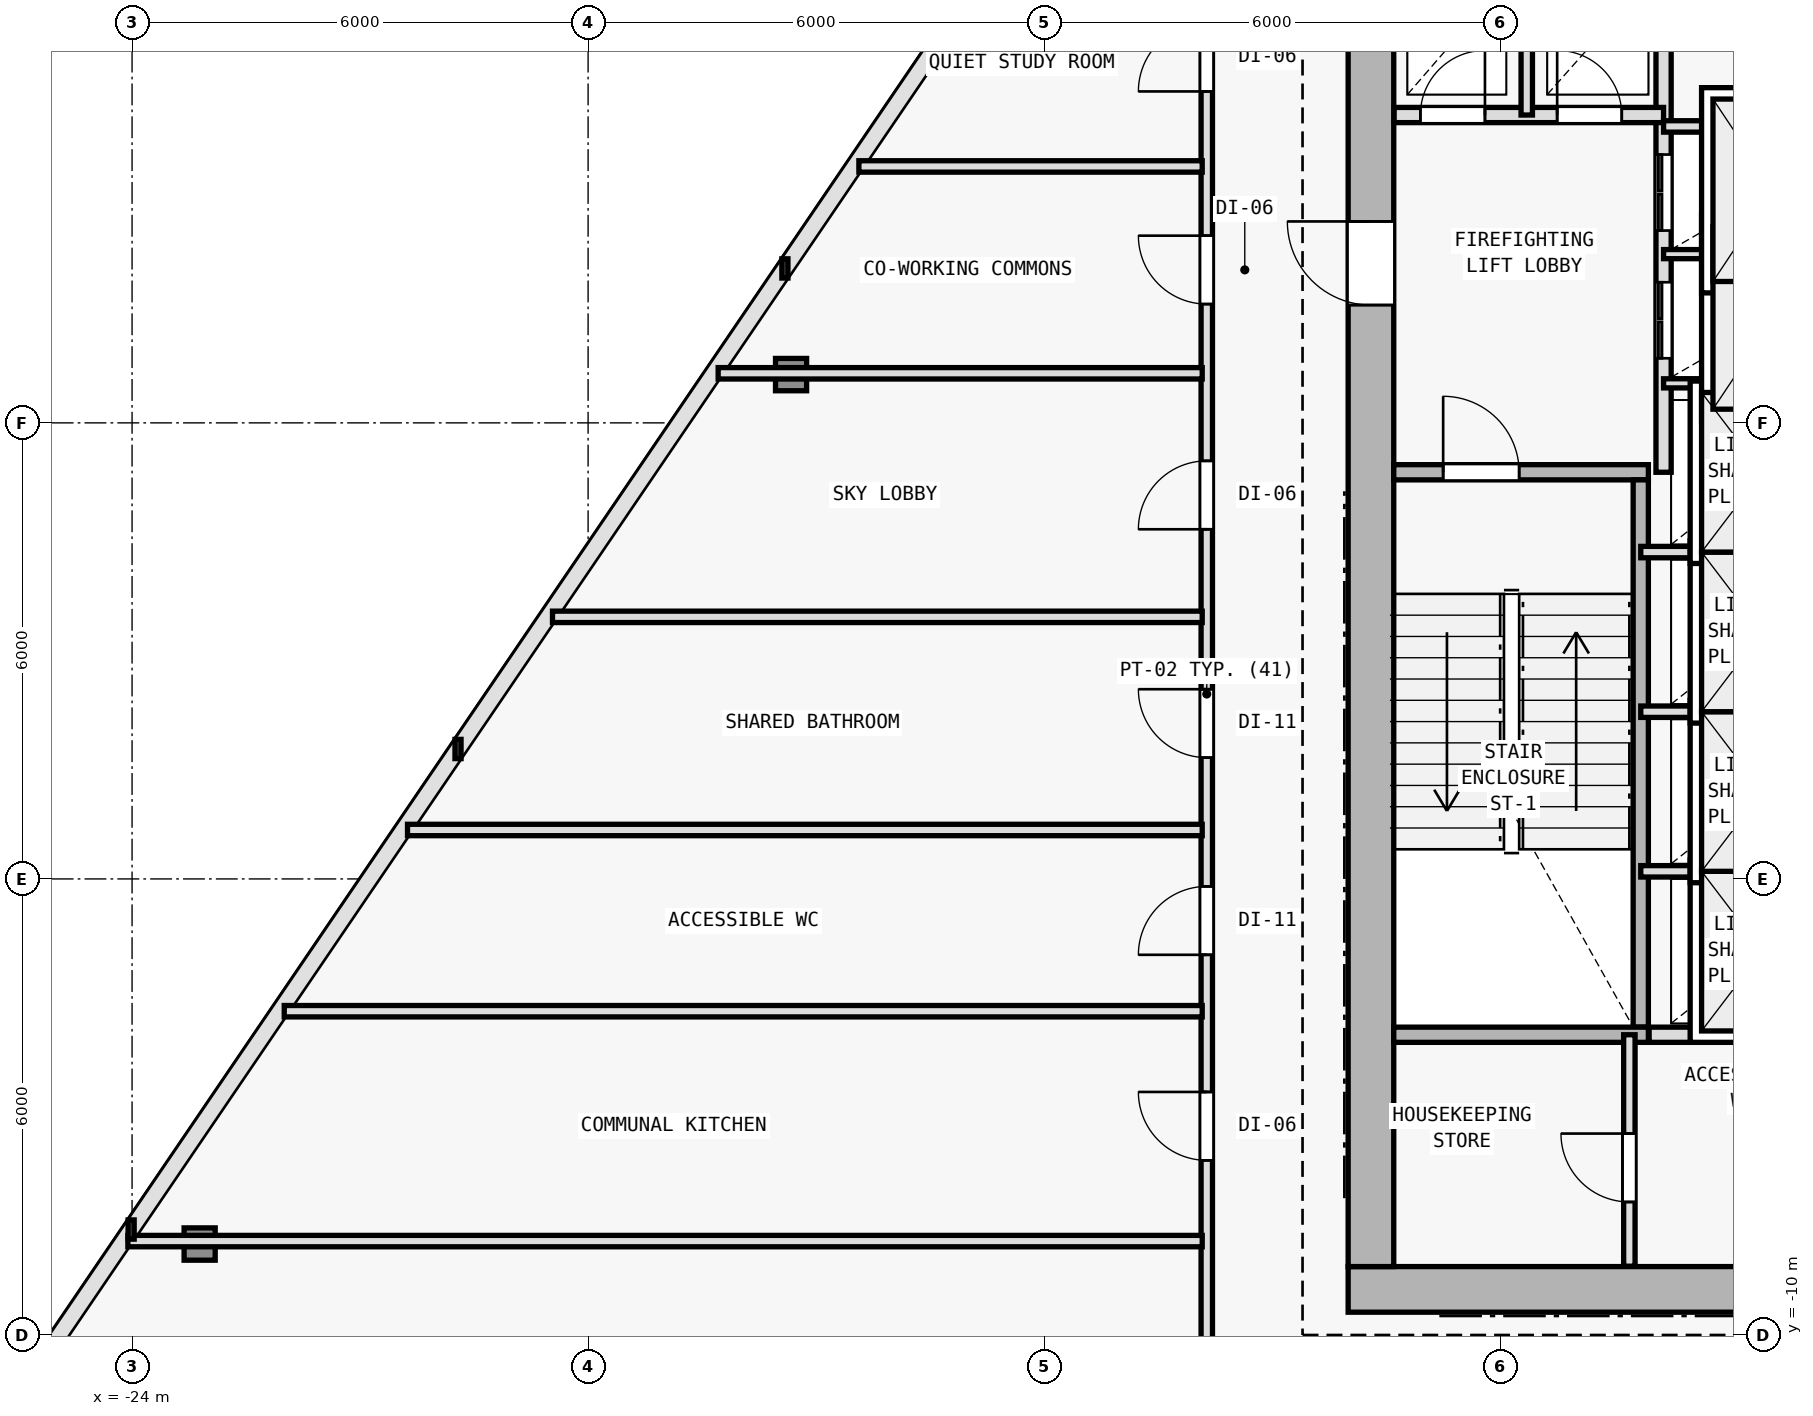
"""IFC4 building model, lengths in metres.
Left out: names, types, materials, properties, quantities, classifications, styles, units other than length and angle.
Written with IfcOpenShell. Run it as: python <this file> out.ifc"""

import sys

from ifc_helpers import new_model, si_unit, direction, frame, frame_2d, origin, origin_2d, place, context, subcontext, project, spatial, rectangle, i_section, extrude, element, fill, save


model = new_model("IFC4")
c1 = context("Model", 3, precision=1e-05, world=origin(), true_north=direction((0.0, 1.0)))
c2 = subcontext(c1, "Body", "Model", "MODEL_VIEW")
j1 = project(units=[si_unit("LENGTHUNIT", "METRE"), si_unit("PLANEANGLEUNIT", "RADIAN")], contexts=[c1])
p1 = place(None, origin())
s1 = spatial("IfcSite", under=j1, at=p1, CompositionType="ELEMENT")
p2 = place(p1, origin())
s2 = spatial("IfcBuilding", under=s1, at=p2, CompositionType="ELEMENT")
p3 = place(p2, frame((0.0, 0.0, 78.0)))
s3 = spatial("IfcBuildingStorey", under=s2, at=p3, CompositionType="ELEMENT", Elevation=78.0)
for number, where, z_axis, x_axis in (
    (1, (-7.7, -9.4, 0.0), (0.0, 0.0, 1.0), (1.0, 0.0, 0.0)),
    (2, (-7.7, 2.0, 0.0), (0.0, 0.0, 1.0), (1.0, 0.0, 0.0)),
):
    element("IfcColumn", number, at=place(p3, frame(where, z_axis=z_axis, x_axis=x_axis)), inside=s3, PredefinedType="COLUMN", context=c2, shape_type="SweptSolid", body=[
        extrude(i_section(OverallWidth=0.416, OverallDepth=0.446, WebThickness=0.025, FlangeThickness=0.04, FilletRadius=0.015, at=origin_2d()), origin(), (0.0, 0.0, 1.0), 4.5),
    ])
p4 = place(p3, frame((-15.33, 2.635, 0.006), z_axis=(0.013595651427, 0.007613564799, 0.999878588576), x_axis=(-0.488603368932, 0.87250601595, 0.0)))
e3 = element("IfcColumn", 3, at=p4, inside=s3, PredefinedType="COLUMN", context=c2, shape_type="SweptSolid", body=[
    extrude(i_section(OverallWidth=0.409, OverallDepth=0.425, WebThickness=0.021, FlangeThickness=0.034, FilletRadius=0.015, at=origin_2d()), origin(), (0.0, 0.0, 1.0), 4.489),
])
p5 = place(p3, frame((-23.111, -8.803, 0.006), z_axis=(0.020171274264, 0.017289663655, 0.999647031319), x_axis=(-0.650791373456, 0.759256602365, 0.0)))
e4 = element("IfcColumn", 4, at=p5, inside=s3, PredefinedType="COLUMN", context=c2, shape_type="SweptSolid", body=[
    extrude(i_section(OverallWidth=0.409, OverallDepth=0.425, WebThickness=0.021, FlangeThickness=0.034, FilletRadius=0.015, at=origin_2d()), origin(), (0.0, 0.0, 1.0), 4.49),
])
p6 = place(p3, frame((-8.0, -9.4, 0.0), z_axis=(0.0, 0.0, 1.0), x_axis=(1.0, 0.0, 0.0)))
e5 = element("IfcWall", 5, at=p6, inside=s3, PredefinedType="SHEAR", context=c2, shape_type="SweptSolid", body=[
    extrude(rectangle(XDim=16.0, YDim=0.6, at=frame_2d((8.0, 0.0))), origin(), (0.0, 0.0, 1.0), 4.25),
])
p7 = place(p6, frame((9.65, 0.0, 0.0)))
e6 = element("IfcOpeningElement", 6, at=p7, cuts=e5, PredefinedType="OPENING", context=c2, shape_type="SweptSolid", body=[
    extrude(rectangle(XDim=1.5, YDim=2.2, at=frame_2d((0.75, 1.1))), frame((0.0, 0.31, 0.0), z_axis=(0.0, -1.0, 0.0), x_axis=(1.0, 0.0, 0.0)), (0.0, 0.0, 1.0), 0.62),
])
p8 = place(p3, frame((-7.7, -9.1, 0.0), z_axis=(0.0, 0.0, 1.0), x_axis=(0.0, 1.0, 0.0)))
e7 = element("IfcWall", 7, at=p8, inside=s3, PredefinedType="SHEAR", context=c2, shape_type="SweptSolid", body=[
    extrude(rectangle(XDim=19.0, YDim=0.6, at=frame_2d((9.5, 0.0))), origin(), (0.0, 0.0, 1.0), 4.25),
])
p9 = place(p8, frame((12.65, 0.0, 0.0)))
e8 = element("IfcOpeningElement", 8, at=p9, cuts=e7, PredefinedType="OPENING", context=c2, shape_type="SweptSolid", body=[
    extrude(rectangle(XDim=1.1, YDim=2.15, at=frame_2d((0.55, 1.075))), frame((0.0, 0.31, 0.0), z_axis=(0.0, -1.0, 0.0), x_axis=(1.0, 0.0, 0.0)), (0.0, 0.0, 1.0), 0.62),
])
p10 = place(p3, frame((-7.4, 1.35, 0.0), z_axis=(0.0, 0.0, 1.0), x_axis=(1.0, 0.0, 0.0)))
e9 = element("IfcWall", 9, at=p10, inside=s3, PredefinedType="SOLIDWALL", context=c2, shape_type="SweptSolid", body=[
    extrude(rectangle(XDim=3.35, YDim=0.2, at=frame_2d((1.675, 0.0))), origin(), (0.0, 0.0, 1.0), 4.25),
])
p11 = place(p10, frame((0.65, 0.0, 0.0)))
e10 = element("IfcOpeningElement", 10, at=p11, cuts=e9, PredefinedType="OPENING", context=c2, shape_type="SweptSolid", body=[
    extrude(rectangle(XDim=1.0, YDim=2.15, at=frame_2d((0.5, 1.075))), frame((0.0, 0.11, 0.0), z_axis=(0.0, -1.0, 0.0), x_axis=(1.0, 0.0, 0.0)), (0.0, 0.0, 1.0), 0.22),
])
p12 = place(p3, frame((-4.15, -5.95, 0.0), z_axis=(0.0, 0.0, 1.0), x_axis=(0.0, 1.0, 0.0)))
e11 = element("IfcWall", 11, at=p12, inside=s3, PredefinedType="SOLIDWALL", context=c2, shape_type="SweptSolid", body=[
    extrude(rectangle(XDim=7.2, YDim=0.2, at=frame_2d((3.6, 0.0))), origin(), (0.0, 0.0, 1.0), 4.25),
])
p13 = place(p3, frame((-3.85, 1.35, 0.0), z_axis=(0.0, 0.0, 1.0), x_axis=(0.0, 1.0, 0.0)))
e12 = element("IfcWall", 12, at=p13, inside=s3, PredefinedType="SOLIDWALL", context=c2, shape_type="SweptSolid", body=[
    extrude(rectangle(XDim=8.545, YDim=0.2, at=frame_2d((4.272, 0.0))), origin(), (0.0, 0.0, 1.0), 4.25),
])
p14 = place(p13, frame((1.5, 0.0, 0.0)))
e13 = element("IfcOpeningElement", 13, at=p14, cuts=e12, PredefinedType="OPENING", context=c2, shape_type="SweptSolid", body=[
    extrude(rectangle(XDim=1.0, YDim=2.15, at=frame_2d((0.5, 1.075))), frame((0.0, 0.11, 0.0), z_axis=(0.0, -1.0, 0.0), x_axis=(1.0, 0.0, 0.0)), (0.0, 0.0, 1.0), 0.22),
])
p15 = place(p13, frame((3.18, 0.0, 0.0)))
e14 = element("IfcOpeningElement", 14, at=p15, cuts=e12, PredefinedType="OPENING", context=c2, shape_type="SweptSolid", body=[
    extrude(rectangle(XDim=1.0, YDim=2.15, at=frame_2d((0.5, 1.075))), frame((0.0, 0.11, 0.0), z_axis=(0.0, -1.0, 0.0), x_axis=(1.0, 0.0, 0.0)), (0.0, 0.0, 1.0), 0.22),
])
p16 = place(p3, frame((-7.395, 6.05, 0.0), z_axis=(0.0, 0.0, 1.0), x_axis=(1.0, 0.0, 0.0)))
e15 = element("IfcWall", 15, at=p16, inside=s3, PredefinedType="SOLIDWALL", context=c2, shape_type="SweptSolid", body=[
    extrude(rectangle(XDim=3.545, YDim=0.2, at=frame_2d((1.772, 0.0))), origin(), (0.0, 0.0, 1.0), 4.25),
])
p17 = place(p16, frame((0.345, 0.0, 0.0)))
e16 = element("IfcOpeningElement", 16, at=p17, cuts=e15, PredefinedType="OPENING", context=c2, shape_type="SweptSolid", body=[
    extrude(rectangle(XDim=0.85, YDim=2.1, at=frame_2d((0.425, 1.05))), frame((0.0, 0.11, 0.0), z_axis=(0.0, -1.0, 0.0), x_axis=(1.0, 0.0, 0.0)), (0.0, 0.0, 1.0), 0.22),
])
p18 = place(p16, frame((2.145, 0.0, 0.0)))
e17 = element("IfcOpeningElement", 17, at=p18, cuts=e15, PredefinedType="OPENING", context=c2, shape_type="SweptSolid", body=[
    extrude(rectangle(XDim=0.85, YDim=2.1, at=frame_2d((0.425, 1.05))), frame((0.0, 0.11, 0.0), z_axis=(0.0, -1.0, 0.0), x_axis=(1.0, 0.0, 0.0)), (0.0, 0.0, 1.0), 0.22),
])
p19 = place(p3, frame((-5.65, 6.05, 0.0), z_axis=(0.0, 0.0, 1.0), x_axis=(0.0, 1.0, 0.0)))
e18 = element("IfcWall", 18, at=p19, inside=s3, PredefinedType="PARTITIONING", context=c2, shape_type="SweptSolid", body=[
    extrude(rectangle(XDim=2.05, YDim=0.15, at=frame_2d((1.025, 0.0))), origin(), (0.0, 0.0, 1.0), 4.25),
])
for number, where, z_axis, x_axis in (
    (19, (-3.85, 2.52, 0.0), (0.0, 0.0, 1.0), (1.0, 0.0, 0.0)),
    (20, (-3.85, 4.22, 0.0), (0.0, 0.0, 1.0), (1.0, 0.0, 0.0)),
):
    element("IfcWall", number, at=place(p3, frame(where, z_axis=z_axis, x_axis=x_axis)), inside=s3, PredefinedType="PARTITIONING", context=c2, shape_type="SweptSolid", body=[
        extrude(rectangle(XDim=2.9, YDim=0.12, at=frame_2d((1.45, 0.0))), origin(), (0.0, 0.0, 1.0), 4.25),
    ])
p20 = place(p3, frame((-3.85, 5.9, 0.0), z_axis=(0.0, 0.0, 1.0), x_axis=(1.0, 0.0, 0.0)))
e21 = element("IfcWall", 21, at=p20, inside=s3, PredefinedType="PARTITIONING", context=c2, shape_type="SweptSolid", body=[
    extrude(rectangle(XDim=2.9, YDim=0.15, at=frame_2d((1.45, 0.0))), origin(), (0.0, 0.0, 1.0), 4.25),
])
for number, where, z_axis, x_axis in (
    (22, (-4.15, -3.9, 0.0), (0.0, 0.0, 1.0), (1.0, 0.0, 0.0)),
    (23, (-4.15, -1.8, 0.0), (0.0, 0.0, 1.0), (1.0, 0.0, 0.0)),
    (24, (-4.15, 0.3, 0.0), (0.0, 0.0, 1.0), (1.0, 0.0, 0.0)),
):
    element("IfcWall", number, at=place(p3, frame(where, z_axis=z_axis, x_axis=x_axis)), inside=s3, PredefinedType="PARTITIONING", context=c2, shape_type="SweptSolid", body=[
        extrude(rectangle(XDim=2.9, YDim=0.15, at=frame_2d((1.45, 0.0))), origin(), (0.0, 0.0, 1.0), 4.25),
    ])
p21 = place(p3, frame((-7.4, -6.05, 0.0), z_axis=(0.0, 0.0, 1.0), x_axis=(1.0, 0.0, 0.0)))
e25 = element("IfcWall", 25, at=p21, inside=s3, PredefinedType="SOLIDWALL", context=c2, shape_type="SweptSolid", body=[
    extrude(rectangle(XDim=3.35, YDim=0.2, at=frame_2d((1.675, 0.0))), origin(), (0.0, 0.0, 1.0), 4.25),
])
p22 = place(p3, frame((-4.04, -6.05, 0.0), z_axis=(0.0, 0.0, 1.0), x_axis=(1.0, 0.0, 0.0)))
e26 = element("IfcWall", 26, at=p22, inside=s3, PredefinedType="SOLIDWALL", context=c2, shape_type="SweptSolid", body=[
    extrude(rectangle(XDim=2.79, YDim=0.2, at=frame_2d((1.395, 0.0))), origin(), (0.0, 0.0, 1.0), 4.25),
])
p23 = place(p3, frame((-4.3, -9.095, 0.0), z_axis=(0.0, 0.0, 1.0), x_axis=(0.0, 1.0, 0.0)))
e27 = element("IfcWall", 27, at=p23, inside=s3, PredefinedType="PARTITIONING", context=c2, shape_type="SweptSolid", body=[
    extrude(rectangle(XDim=3.045, YDim=0.15, at=frame_2d((1.522, 0.0))), origin(), (0.0, 0.0, 1.0), 4.25),
])
p24 = place(p23, frame((0.845, 0.0, 0.0)))
e28 = element("IfcOpeningElement", 28, at=p24, cuts=e27, PredefinedType="OPENING", context=c2, shape_type="SweptSolid", body=[
    extrude(rectangle(XDim=0.9, YDim=2.1, at=frame_2d((0.45, 1.05))), frame((0.0, 0.085, 0.0), z_axis=(0.0, -1.0, 0.0), x_axis=(1.0, 0.0, 0.0)), (0.0, 0.0, 1.0), 0.17),
])
p25 = place(p3, frame((-9.86, -11.56, 0.0), z_axis=(0.0, 0.0, 1.0), x_axis=(0.0, 1.0, 0.0)))
e29 = element("IfcWall", 29, at=p25, inside=s3, PredefinedType="PARTITIONING", context=c2, shape_type="SweptSolid", body=[
    extrude(rectangle(XDim=19.986, YDim=0.15, at=frame_2d((9.993, 0.0))), origin(), (0.0, 0.0, 1.0), 3.509),
])
p26 = place(p25, frame((9.156, 0.0, 0.0)))
e30 = element("IfcOpeningElement", 30, at=p26, cuts=e29, PredefinedType="OPENING", context=c2, shape_type="SweptSolid", body=[
    extrude(rectangle(XDim=0.9, YDim=2.1, at=frame_2d((0.45, 1.05))), frame((0.0, 0.085, 0.0), z_axis=(0.0, -1.0, 0.0), x_axis=(1.0, 0.0, 0.0)), (0.0, 0.0, 1.0), 0.17),
])
p27 = place(p25, frame((6.562, 0.0, 0.0)))
e31 = element("IfcOpeningElement", 31, at=p27, cuts=e29, PredefinedType="OPENING", context=c2, shape_type="SweptSolid", body=[
    extrude(rectangle(XDim=0.9, YDim=2.1, at=frame_2d((0.45, 1.05))), frame((0.0, 0.085, 0.0), z_axis=(0.0, -1.0, 0.0), x_axis=(1.0, 0.0, 0.0)), (0.0, 0.0, 1.0), 0.17),
])
p28 = place(p25, frame((3.857, 0.0, 0.0)))
e32 = element("IfcOpeningElement", 32, at=p28, cuts=e29, PredefinedType="OPENING", context=c2, shape_type="SweptSolid", body=[
    extrude(rectangle(XDim=0.9, YDim=2.1, at=frame_2d((0.45, 1.05))), frame((0.0, 0.085, 0.0), z_axis=(0.0, -1.0, 0.0), x_axis=(1.0, 0.0, 0.0)), (0.0, 0.0, 1.0), 0.17),
])
p29 = place(p25, frame((17.92, 0.0, 0.0)))
e33 = element("IfcOpeningElement", 33, at=p29, cuts=e29, PredefinedType="OPENING", context=c2, shape_type="SweptSolid", body=[
    extrude(rectangle(XDim=0.9, YDim=2.1, at=frame_2d((0.45, 1.05))), frame((0.0, 0.085, 0.0), z_axis=(0.0, -1.0, 0.0), x_axis=(1.0, 0.0, 0.0)), (0.0, 0.0, 1.0), 0.17),
])
p30 = place(p25, frame((15.123, 0.0, 0.0)))
e34 = element("IfcOpeningElement", 34, at=p30, cuts=e29, PredefinedType="OPENING", context=c2, shape_type="SweptSolid", body=[
    extrude(rectangle(XDim=0.9, YDim=2.1, at=frame_2d((0.45, 1.05))), frame((0.0, 0.085, 0.0), z_axis=(0.0, -1.0, 0.0), x_axis=(1.0, 0.0, 0.0)), (0.0, 0.0, 1.0), 0.17),
])
p31 = place(p25, frame((12.16, 0.0, 0.0)))
e35 = element("IfcOpeningElement", 35, at=p31, cuts=e29, PredefinedType="OPENING", context=c2, shape_type="SweptSolid", body=[
    extrude(rectangle(XDim=0.9, YDim=2.1, at=frame_2d((0.45, 1.05))), frame((0.0, 0.085, 0.0), z_axis=(0.0, -1.0, 0.0), x_axis=(1.0, 0.0, 0.0)), (0.0, 0.0, 1.0), 0.17),
])
p32 = place(p3, frame((-9.92, 2.652, 0.0), z_axis=(0.0, 0.0, 1.0), x_axis=(-1.0, 0.0, 0.0)))
e36 = element("IfcWall", 36, at=p32, inside=s3, PredefinedType="PARTITIONING", context=c2, shape_type="SweptSolid", body=[
    extrude(rectangle(XDim=6.369, YDim=0.15, at=frame_2d((3.185, 0.0))), origin(), (0.0, 0.0, 1.0), 3.725),
])
p33 = place(p3, frame((-9.92, -8.765, 0.0), z_axis=(0.0, 0.0, 1.0), x_axis=(-1.0, 0.0, 0.0)))
e37 = element("IfcWall", 37, at=p33, inside=s3, PredefinedType="PARTITIONING", context=c2, shape_type="SweptSolid", body=[
    extrude(rectangle(XDim=14.135, YDim=0.15, at=frame_2d((7.068, 0.0))), origin(), (0.0, 0.0, 1.0), 3.509),
])
p34 = place(p3, frame((-9.92, -3.356, 0.0), z_axis=(0.0, 0.0, 1.0), x_axis=(-1.0, 0.0, 0.0)))
e38 = element("IfcWall", 38, at=p34, inside=s3, PredefinedType="PARTITIONING", context=c2, shape_type="SweptSolid", body=[
    extrude(rectangle(XDim=10.456, YDim=0.15, at=frame_2d((5.228, 0.0))), origin(), (0.0, 0.0, 1.0), 3.735),
])
p35 = place(p3, frame((-9.92, -0.552, 0.0), z_axis=(0.0, 0.0, 1.0), x_axis=(-1.0, 0.0, 0.0)))
e39 = element("IfcWall", 39, at=p35, inside=s3, PredefinedType="PARTITIONING", context=c2, shape_type="SweptSolid", body=[
    extrude(rectangle(XDim=8.549, YDim=0.15, at=frame_2d((4.274, 0.0))), origin(), (0.0, 0.0, 1.0), 3.735),
])
p36 = place(p3, frame((-9.92, -5.74, 0.0), z_axis=(0.0, 0.0, 1.0), x_axis=(-1.0, 0.0, 0.0)))
e40 = element("IfcWall", 40, at=p36, inside=s3, PredefinedType="PARTITIONING", context=c2, shape_type="SweptSolid", body=[
    extrude(rectangle(XDim=12.078, YDim=0.15, at=frame_2d((6.039, 0.0))), origin(), (0.0, 0.0, 1.0), 3.735),
])
p37 = place(p3, frame((-9.92, 5.374, 0.0), z_axis=(0.0, 0.0, 1.0), x_axis=(-1.0, 0.0, 0.0)))
e41 = element("IfcWall", 41, at=p37, inside=s3, PredefinedType="PARTITIONING", context=c2, shape_type="SweptSolid", body=[
    extrude(rectangle(XDim=4.517, YDim=0.15, at=frame_2d((2.259, 0.0))), origin(), (0.0, 0.0, 1.0), 3.725),
])
p38 = place(p9, origin())
e42 = element("IfcDoor", 42, at=p38, inside=s3, OperationType="SINGLE_SWING_RIGHT", PredefinedType="DOOR", context=c2, shape_type="SweptSolid", body=[
    extrude(rectangle(XDim=1.1, YDim=2.15, at=frame_2d((0.55, 1.075))), frame((0.0, 0.025, 0.0), z_axis=(0.0, -1.0, 0.0), x_axis=(1.0, 0.0, 0.0)), (0.0, 0.0, 1.0), 0.05),
])
fill(e8, e42)
p39 = place(p11, origin())
e43 = element("IfcDoor", 43, at=p39, inside=s3, OperationType="SINGLE_SWING_LEFT", PredefinedType="DOOR", context=c2, shape_type="SweptSolid", body=[
    extrude(rectangle(XDim=1.0, YDim=2.15, at=frame_2d((0.5, 1.075))), frame((0.0, 0.025, 0.0), z_axis=(0.0, -1.0, 0.0), x_axis=(1.0, 0.0, 0.0)), (0.0, 0.0, 1.0), 0.05),
])
fill(e10, e43)
p40 = place(p17, origin())
e44 = element("IfcDoor", 44, at=p40, inside=s3, OperationType="SINGLE_SWING_RIGHT", PredefinedType="DOOR", context=c2, shape_type="SweptSolid", body=[
    extrude(rectangle(XDim=0.85, YDim=2.1, at=frame_2d((0.425, 1.05))), frame((0.0, 0.025, 0.0), z_axis=(0.0, -1.0, 0.0), x_axis=(1.0, 0.0, 0.0)), (0.0, 0.0, 1.0), 0.05),
])
fill(e16, e44)
p41 = place(p18, origin())
e45 = element("IfcDoor", 45, at=p41, inside=s3, OperationType="SINGLE_SWING_LEFT", PredefinedType="DOOR", context=c2, shape_type="SweptSolid", body=[
    extrude(rectangle(XDim=0.85, YDim=2.1, at=frame_2d((0.425, 1.05))), frame((0.0, 0.025, 0.0), z_axis=(0.0, -1.0, 0.0), x_axis=(1.0, 0.0, 0.0)), (0.0, 0.0, 1.0), 0.05),
])
fill(e17, e45)
p42 = place(p14, origin())
e46 = element("IfcDoor", 46, at=p42, inside=s3, OperationType="DOUBLE_DOOR_SLIDING", PredefinedType="DOOR", context=c2, shape_type="SweptSolid", body=[
    extrude(rectangle(XDim=1.0, YDim=2.15, at=frame_2d((0.5, 1.075))), frame((0.0, 0.025, 0.0), z_axis=(0.0, -1.0, 0.0), x_axis=(1.0, 0.0, 0.0)), (0.0, 0.0, 1.0), 0.05),
])
fill(e13, e46)
p43 = place(p15, origin())
e47 = element("IfcDoor", 47, at=p43, inside=s3, OperationType="DOUBLE_DOOR_SLIDING", PredefinedType="DOOR", context=c2, shape_type="SweptSolid", body=[
    extrude(rectangle(XDim=1.0, YDim=2.15, at=frame_2d((0.5, 1.075))), frame((0.0, 0.025, 0.0), z_axis=(0.0, -1.0, 0.0), x_axis=(1.0, 0.0, 0.0)), (0.0, 0.0, 1.0), 0.05),
])
fill(e14, e47)
p44 = place(p24, origin())
e48 = element("IfcDoor", 48, at=p44, inside=s3, OperationType="SINGLE_SWING_RIGHT", PredefinedType="DOOR", context=c2, shape_type="SweptSolid", body=[
    extrude(rectangle(XDim=0.9, YDim=2.1, at=frame_2d((0.45, 1.05))), frame((0.0, 0.025, 0.0), z_axis=(0.0, -1.0, 0.0), x_axis=(1.0, 0.0, 0.0)), (0.0, 0.0, 1.0), 0.05),
])
fill(e28, e48)
p45 = place(p26, origin())
e49 = element("IfcDoor", 49, at=p45, inside=s3, OperationType="SINGLE_SWING_RIGHT", PredefinedType="DOOR", context=c2, shape_type="SweptSolid", body=[
    extrude(rectangle(XDim=0.9, YDim=2.1, at=frame_2d((0.45, 1.05))), frame((0.0, 0.025, 0.0), z_axis=(0.0, -1.0, 0.0), x_axis=(1.0, 0.0, 0.0)), (0.0, 0.0, 1.0), 0.05),
])
fill(e30, e49)
p46 = place(p27, origin())
e50 = element("IfcDoor", 50, at=p46, inside=s3, OperationType="SINGLE_SWING_LEFT", PredefinedType="DOOR", context=c2, shape_type="SweptSolid", body=[
    extrude(rectangle(XDim=0.9, YDim=2.1, at=frame_2d((0.45, 1.05))), frame((0.0, 0.025, 0.0), z_axis=(0.0, -1.0, 0.0), x_axis=(1.0, 0.0, 0.0)), (0.0, 0.0, 1.0), 0.05),
])
fill(e31, e50)
p47 = place(p28, origin())
e51 = element("IfcDoor", 51, at=p47, inside=s3, OperationType="SINGLE_SWING_RIGHT", PredefinedType="DOOR", context=c2, shape_type="SweptSolid", body=[
    extrude(rectangle(XDim=0.9, YDim=2.1, at=frame_2d((0.45, 1.05))), frame((0.0, 0.025, 0.0), z_axis=(0.0, -1.0, 0.0), x_axis=(1.0, 0.0, 0.0)), (0.0, 0.0, 1.0), 0.05),
])
fill(e32, e51)
p48 = place(p29, origin())
e52 = element("IfcDoor", 52, at=p48, inside=s3, OperationType="SINGLE_SWING_LEFT", PredefinedType="DOOR", context=c2, shape_type="SweptSolid", body=[
    extrude(rectangle(XDim=0.9, YDim=2.1, at=frame_2d((0.45, 1.05))), frame((0.0, 0.025, 0.0), z_axis=(0.0, -1.0, 0.0), x_axis=(1.0, 0.0, 0.0)), (0.0, 0.0, 1.0), 0.05),
])
fill(e33, e52)
p49 = place(p30, origin())
e53 = element("IfcDoor", 53, at=p49, inside=s3, OperationType="SINGLE_SWING_RIGHT", PredefinedType="DOOR", context=c2, shape_type="SweptSolid", body=[
    extrude(rectangle(XDim=0.9, YDim=2.1, at=frame_2d((0.45, 1.05))), frame((0.0, 0.025, 0.0), z_axis=(0.0, -1.0, 0.0), x_axis=(1.0, 0.0, 0.0)), (0.0, 0.0, 1.0), 0.05),
])
fill(e34, e53)
p50 = place(p31, origin())
e54 = element("IfcDoor", 54, at=p50, inside=s3, OperationType="SINGLE_SWING_LEFT", PredefinedType="DOOR", context=c2, shape_type="SweptSolid", body=[
    extrude(rectangle(XDim=0.9, YDim=2.1, at=frame_2d((0.45, 1.05))), frame((0.0, 0.025, 0.0), z_axis=(0.0, -1.0, 0.0), x_axis=(1.0, 0.0, 0.0)), (0.0, 0.0, 1.0), 0.05),
])
fill(e35, e54)
save(model, sys.argv[1])
